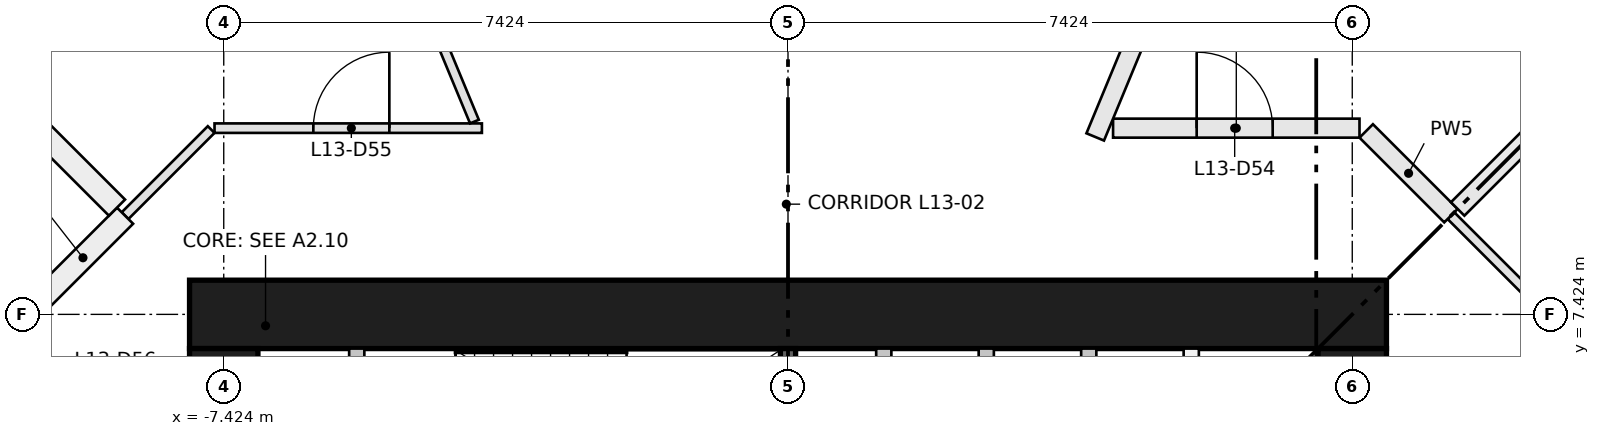
"""IFC4 building model, lengths in metres.
Left out: names, types, materials, properties, quantities, classifications, styles, units other than length and angle.
Written with IfcOpenShell. Run it as: python <this file> out.ifc"""

import sys

from ifc_helpers import new_model, si_unit, direction, frame, frame_2d, origin, place, context, subcontext, project, spatial, rectangle, extrude, element, fill, save


model = new_model("IFC4")
c1 = context("Model", 3, precision=1e-05, world=origin(), true_north=direction((0.0, 1.0)))
c2 = subcontext(c1, "Body", "Model", "MODEL_VIEW")
j1 = project(units=[si_unit("LENGTHUNIT", "METRE"), si_unit("PLANEANGLEUNIT", "RADIAN")], contexts=[c1])
p1 = place(None, origin())
s1 = spatial("IfcSite", under=j1, at=p1, CompositionType="ELEMENT")
p2 = place(p1, origin())
s2 = spatial("IfcBuilding", under=s1, at=p2, CompositionType="ELEMENT")
p3 = place(p2, frame((0.0, 0.0, 51.75)))
s3 = spatial("IfcBuildingStorey", under=s2, at=p3, CompositionType="ELEMENT", Elevation=51.75)
p4 = place(p3, frame((-7.874, 7.424, 0.0), z_axis=(0.0, 0.0, 1.0), x_axis=(1.0, 0.0, 0.0)))
e1 = element("IfcWall", 1, at=p4, inside=s3, PredefinedType="SHEAR", context=c2, shape_type="SweptSolid", body=[
    extrude(rectangle(XDim=15.748, YDim=0.9, at=frame_2d((7.874, 0.0))), origin(), (0.0, 0.0, 1.0), 3.65),
])
p5 = place(p3, frame((-7.424, -6.974, 0.0), z_axis=(0.0, 0.0, 1.0), x_axis=(0.0, 1.0, 0.0)))
e2 = element("IfcWall", 2, at=p5, inside=s3, PredefinedType="SHEAR", context=c2, shape_type="SweptSolid", body=[
    extrude(rectangle(XDim=13.948, YDim=0.9, at=frame_2d((6.974, 0.0))), origin(), (0.0, 0.0, 1.0), 3.65),
])
p6 = place(p5, frame((6.474, 0.0, 0.0)))
e3 = element("IfcOpeningElement", 3, at=p6, cuts=e2, PredefinedType="OPENING", context=c2, shape_type="SweptSolid", body=[
    extrude(rectangle(XDim=1.0, YDim=2.1, at=frame_2d((0.5, 1.05))), frame((0.0, 0.46, 0.0), z_axis=(0.0, -1.0, 0.0), x_axis=(1.0, 0.0, 0.0)), (0.0, 0.0, 1.0), 0.92),
])
p7 = place(p5, frame((3.35, 0.0, 0.0)))
e4 = element("IfcOpeningElement", 4, at=p7, cuts=e2, PredefinedType="OPENING", context=c2, shape_type="SweptSolid", body=[
    extrude(rectangle(XDim=1.8, YDim=2.1, at=frame_2d((0.9, 1.05))), frame((0.0, 0.46, 0.0), z_axis=(0.0, -1.0, 0.0), x_axis=(1.0, 0.0, 0.0)), (0.0, 0.0, 1.0), 0.92),
])
p8 = place(p5, frame((8.799, 0.0, 0.0)))
e5 = element("IfcOpeningElement", 5, at=p8, cuts=e2, PredefinedType="OPENING", context=c2, shape_type="SweptSolid", body=[
    extrude(rectangle(XDim=1.8, YDim=2.1, at=frame_2d((0.9, 1.05))), frame((0.0, 0.46, 0.0), z_axis=(0.0, -1.0, 0.0), x_axis=(1.0, 0.0, 0.0)), (0.0, 0.0, 1.0), 0.92),
])
p9 = place(p5, frame((11.974, 0.0, 0.0)))
e6 = element("IfcOpeningElement", 6, at=p9, cuts=e2, PredefinedType="OPENING", context=c2, shape_type="SweptSolid", body=[
    extrude(rectangle(XDim=1.0, YDim=2.1, at=frame_2d((0.5, 1.05))), frame((0.0, 0.46, 0.0), z_axis=(0.0, -1.0, 0.0), x_axis=(1.0, 0.0, 0.0)), (0.0, 0.0, 1.0), 0.92),
])
p10 = place(p3, frame((7.424, -6.974, 0.0), z_axis=(0.0, 0.0, 1.0), x_axis=(0.0, 1.0, 0.0)))
e7 = element("IfcWall", 7, at=p10, inside=s3, PredefinedType="SHEAR", context=c2, shape_type="SweptSolid", body=[
    extrude(rectangle(XDim=13.948, YDim=0.9, at=frame_2d((6.974, 0.0))), origin(), (0.0, 0.0, 1.0), 3.65),
])
p11 = place(p10, frame((6.474, 0.0, 0.0)))
e8 = element("IfcOpeningElement", 8, at=p11, cuts=e7, PredefinedType="OPENING", context=c2, shape_type="SweptSolid", body=[
    extrude(rectangle(XDim=1.0, YDim=2.1, at=frame_2d((0.5, 1.05))), frame((0.0, 0.46, 0.0), z_axis=(0.0, -1.0, 0.0), x_axis=(1.0, 0.0, 0.0)), (0.0, 0.0, 1.0), 0.92),
])
p12 = place(p10, frame((3.35, 0.0, 0.0)))
e9 = element("IfcOpeningElement", 9, at=p12, cuts=e7, PredefinedType="OPENING", context=c2, shape_type="SweptSolid", body=[
    extrude(rectangle(XDim=1.8, YDim=2.1, at=frame_2d((0.9, 1.05))), frame((0.0, 0.46, 0.0), z_axis=(0.0, -1.0, 0.0), x_axis=(1.0, 0.0, 0.0)), (0.0, 0.0, 1.0), 0.92),
])
p13 = place(p10, frame((8.799, 0.0, 0.0)))
e10 = element("IfcOpeningElement", 10, at=p13, cuts=e7, PredefinedType="OPENING", context=c2, shape_type="SweptSolid", body=[
    extrude(rectangle(XDim=1.8, YDim=2.1, at=frame_2d((0.9, 1.05))), frame((0.0, 0.46, 0.0), z_axis=(0.0, -1.0, 0.0), x_axis=(1.0, 0.0, 0.0)), (0.0, 0.0, 1.0), 0.92),
])
p14 = place(p3, frame((0.0, 5.574, 0.0), z_axis=(0.0, 0.0, 1.0), x_axis=(0.0, 1.0, 0.0)))
e11 = element("IfcWall", 11, at=p14, inside=s3, PredefinedType="SHEAR", context=c2, shape_type="SweptSolid", body=[
    extrude(rectangle(XDim=1.4, YDim=0.2, at=frame_2d((0.7, 0.0))), origin(), (0.0, 0.0, 1.0), 3.3),
])
for number, where, z_axis, x_axis in (
    (12, (1.26, 4.174, 0.0), (0.0, 0.0, 1.0), (0.0, 1.0, 0.0)),
    (13, (2.609, 4.174, 0.0), (0.0, 0.0, 1.0), (0.0, 1.0, 0.0)),
    (14, (3.957, 4.174, 0.0), (0.0, 0.0, 1.0), (0.0, 1.0, 0.0)),
    (15, (5.305, 4.174, 0.0), (0.0, 0.0, 1.0), (0.0, 1.0, 0.0)),
):
    element("IfcWall", number, at=place(p3, frame(where, z_axis=z_axis, x_axis=x_axis)), inside=s3, PredefinedType="PARTITIONING", context=c2, shape_type="SweptSolid", body=[
        extrude(rectangle(XDim=2.8, YDim=0.2, at=frame_2d((1.4, 0.0))), origin(), (0.0, 0.0, 1.0), 3.3),
    ])
p15 = place(p3, frame((-5.674, 4.174, 0.0), z_axis=(0.0, 0.0, 1.0), x_axis=(0.0, 1.0, 0.0)))
e16 = element("IfcWall", 16, at=p15, inside=s3, PredefinedType="PARTITIONING", context=c2, shape_type="SweptSolid", body=[
    extrude(rectangle(XDim=2.8, YDim=0.2, at=frame_2d((1.4, 0.0))), origin(), (0.0, 0.0, 1.0), 3.3),
])
p16 = place(p15, frame((0.125, 0.0, 0.0)))
e17 = element("IfcOpeningElement", 17, at=p16, cuts=e16, PredefinedType="OPENING", context=c2, shape_type="SweptSolid", body=[
    extrude(rectangle(XDim=0.95, YDim=2.1, at=frame_2d((0.475, 1.05))), frame((0.0, 0.11, 0.0), z_axis=(0.0, -1.0, 0.0), x_axis=(1.0, 0.0, 0.0)), (0.0, 0.0, 1.0), 0.22),
])
p17 = place(p15, frame((1.725, 0.0, 0.0)))
e18 = element("IfcOpeningElement", 18, at=p17, cuts=e16, PredefinedType="OPENING", context=c2, shape_type="SweptSolid", body=[
    extrude(rectangle(XDim=0.95, YDim=2.1, at=frame_2d((0.475, 1.05))), frame((0.0, 0.11, 0.0), z_axis=(0.0, -1.0, 0.0), x_axis=(1.0, 0.0, 0.0)), (0.0, 0.0, 1.0), 0.22),
])
p18 = place(p3, frame((8.722, 8.722, 0.0), z_axis=(0.0, 0.0, 1.0), x_axis=(0.70718294931, -0.707030604857, 0.0)))
e19 = element("IfcWall", 19, at=p18, inside=s3, PredefinedType="PARTITIONING", context=c2, shape_type="SweptSolid", body=[
    extrude(rectangle(XDim=1.603, YDim=0.125, at=frame_2d((0.801, 0.0))), origin(), (0.0, 0.0, 1.0), 3.3),
])
p19 = place(p3, frame((4.277, 9.874, 0.0), z_axis=(0.0, 0.0, 1.0), x_axis=(1.0, 0.0, 0.0)))
e20 = element("IfcWall", 20, at=p19, inside=s3, PredefinedType="PARTITIONING", context=c2, shape_type="SweptSolid", body=[
    extrude(rectangle(XDim=3.242, YDim=0.25, at=frame_2d((1.621, 0.0))), origin(), (0.0, 0.0, 1.0), 3.3),
])
p20 = place(p19, frame((1.1, 0.0, 0.0)))
e21 = element("IfcOpeningElement", 21, at=p20, cuts=e20, PredefinedType="OPENING", context=c2, shape_type="SweptSolid", body=[
    extrude(rectangle(XDim=1.0, YDim=2.1, at=frame_2d((0.5, 1.05))), frame((0.0, 0.135, 0.0), z_axis=(0.0, -1.0, 0.0), x_axis=(1.0, 0.0, 0.0)), (0.0, 0.0, 1.0), 0.27),
])
p21 = place(p3, frame((7.608, 9.837, 0.0), z_axis=(0.0, 0.0, 1.0), x_axis=(0.707029353672, -0.707184200224, 0.0)))
e22 = element("IfcWall", 22, at=p21, inside=s3, PredefinedType="PARTITIONING", context=c2, shape_type="SweptSolid", body=[
    extrude(rectangle(XDim=1.577, YDim=0.25, at=frame_2d((0.788, 0.0))), origin(), (0.0, 0.0, 1.0), 3.3),
])
p22 = place(p3, frame((-8.722, 8.722, 0.0), z_axis=(0.0, 0.0, 1.0), x_axis=(0.707030604857, 0.70718294931, 0.0)))
e23 = element("IfcWall", 23, at=p22, inside=s3, PredefinedType="PARTITIONING", context=c2, shape_type="SweptSolid", body=[
    extrude(rectangle(XDim=1.603, YDim=0.125, at=frame_2d((0.801, 0.0))), origin(), (0.0, 0.0, 1.0), 3.3),
])
p23 = place(p3, frame((-7.545, 9.874, 0.0), z_axis=(0.0, 0.0, 1.0), x_axis=(1.0, 0.0, 0.0)))
e24 = element("IfcWall", 24, at=p23, inside=s3, PredefinedType="PARTITIONING", context=c2, shape_type="SweptSolid", body=[
    extrude(rectangle(XDim=3.518, YDim=0.125, at=frame_2d((1.759, 0.0))), origin(), (0.0, 0.0, 1.0), 3.3),
])
p24 = place(p23, frame((1.3, 0.0, 0.0)))
e25 = element("IfcOpeningElement", 25, at=p24, cuts=e24, PredefinedType="OPENING", context=c2, shape_type="SweptSolid", body=[
    extrude(rectangle(XDim=1.0, YDim=2.1, at=frame_2d((0.5, 1.05))), frame((0.0, 0.073, 0.0), z_axis=(0.0, -1.0, 0.0), x_axis=(1.0, 0.0, 0.0)), (0.0, 0.0, 1.0), 0.145),
])
p25 = place(p3, frame((-9.83, 7.615, 0.0), z_axis=(0.0, 0.0, 1.0), x_axis=(0.70718471217, 0.707028841614, 0.0)))
e26 = element("IfcWall", 26, at=p25, inside=s3, PredefinedType="PARTITIONING", context=c2, shape_type="SweptSolid", body=[
    extrude(rectangle(XDim=1.566, YDim=0.3, at=frame_2d((0.783, 0.0))), origin(), (0.0, 0.0, 1.0), 3.3),
])
p26 = place(p3, frame((13.011, 13.011, 0.0), z_axis=(0.0, 0.0, 1.0), x_axis=(-0.707106781187, -0.707106781187, 0.0)))
e27 = element("IfcWall", 27, at=p26, inside=s3, PredefinedType="PARTITIONING", context=c2, shape_type="SweptSolid", body=[
    extrude(rectangle(XDim=5.94, YDim=0.25, at=frame_2d((2.97, 0.0))), origin(), (0.0, 0.0, 1.0), 3.3),
])
p27 = place(p3, frame((4.042, 9.759, 0.0), z_axis=(0.0, 0.0, 1.0), x_axis=(0.382697682956, 0.923873629595, 0.0)))
e28 = element("IfcWall", 28, at=p27, inside=s3, PredefinedType="PARTITIONING", context=c2, shape_type="SweptSolid", body=[
    extrude(rectangle(XDim=4.468, YDim=0.25, at=frame_2d((2.234, 0.0))), origin(), (0.0, 0.0, 1.0), 3.3),
])
p28 = place(p3, frame((-4.126, 9.96, 0.0), z_axis=(0.0, 0.0, 1.0), x_axis=(-0.382676572561, 0.923882373905, 0.0)))
e29 = element("IfcWall", 29, at=p28, inside=s3, PredefinedType="PARTITIONING", context=c2, shape_type="SweptSolid", body=[
    extrude(rectangle(XDim=4.249, YDim=0.125, at=frame_2d((2.125, 0.0))), origin(), (0.0, 0.0, 1.0), 3.3),
])
p29 = place(p3, frame((-8.829, 8.829, 0.0), z_axis=(0.0, 0.0, 1.0), x_axis=(-0.707106781187, 0.707106781187, 0.0)))
e30 = element("IfcWall", 30, at=p29, inside=s3, PredefinedType="PARTITIONING", context=c2, shape_type="SweptSolid", body=[
    extrude(rectangle(XDim=5.914, YDim=0.3, at=frame_2d((2.957, 0.0))), origin(), (0.0, 0.0, 1.0), 3.3),
])
p30 = place(p20, origin())
e31 = element("IfcDoor", 31, at=p30, inside=s3, OperationType="SINGLE_SWING_LEFT", PredefinedType="DOOR", context=c2, shape_type="SweptSolid", body=[
    extrude(rectangle(XDim=1.0, YDim=2.1, at=frame_2d((0.5, 1.05))), frame((0.0, 0.025, 0.0), z_axis=(0.0, -1.0, 0.0), x_axis=(1.0, 0.0, 0.0)), (0.0, 0.0, 1.0), 0.05),
])
fill(e21, e31)
p31 = place(p24, origin())
e32 = element("IfcDoor", 32, at=p31, inside=s3, OperationType="SINGLE_SWING_RIGHT", PredefinedType="DOOR", context=c2, shape_type="SweptSolid", body=[
    extrude(rectangle(XDim=1.0, YDim=2.1, at=frame_2d((0.5, 1.05))), frame((0.0, 0.025, 0.0), z_axis=(0.0, -1.0, 0.0), x_axis=(1.0, 0.0, 0.0)), (0.0, 0.0, 1.0), 0.05),
])
fill(e25, e32)
save(model, sys.argv[1])
